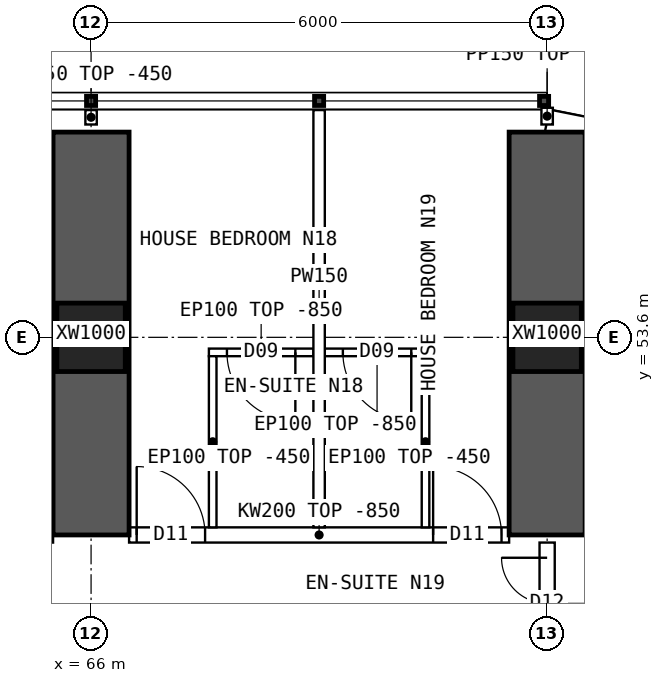
"""IFC4 building model, lengths in metres.
Left out: names, types, materials, properties, quantities, classifications, styles, units other than length and angle.
Written with IfcOpenShell. Run it as: python <this file> out.ifc"""

import sys

from ifc_helpers import new_model, si_unit, direction, frame, frame_2d, origin, origin_2d, place, context, subcontext, project, spatial, polyline, rectangle, hollow_rectangle, outline, extrude, element, fill, save


model = new_model("IFC4")
c1 = context("Model", 3, precision=1e-05, world=origin(), true_north=direction((0.0, 1.0)))
c2 = subcontext(c1, "Body", "Model", "MODEL_VIEW")
j1 = project(units=[si_unit("LENGTHUNIT", "METRE"), si_unit("PLANEANGLEUNIT", "RADIAN")], contexts=[c1])
p1 = place(None, origin())
s1 = spatial("IfcSite", under=j1, at=p1, CompositionType="ELEMENT")
p2 = place(p1, origin())
s2 = spatial("IfcBuilding", under=s1, at=p2, CompositionType="ELEMENT")
p3 = place(p2, frame((0.0, 0.0, 35.2)))
s3 = spatial("IfcBuildingStorey", under=s2, at=p3, CompositionType="ELEMENT", Elevation=35.2)
for number, where, z_axis, x_axis in (
    (1, (66.0, 53.6, 0.0), (0.0, 0.0, 1.0), (1.0, 0.0, 0.0)),
    (2, (72.0, 53.6, 0.0), (0.0, 0.0, 1.0), (1.0, 0.0, 0.0)),
):
    element("IfcColumn", number, at=place(p3, frame(where, z_axis=z_axis, x_axis=x_axis)), inside=s3, PredefinedType="COLUMN", context=c2, shape_type="SweptSolid", body=[
        extrude(hollow_rectangle(XDim=0.9, YDim=0.9, WallThickness=0.09, at=origin_2d()), origin(), (0.0, 0.0, 1.0), 3.75),
    ])
for number, where, z_axis, x_axis in (
    (3, (66.0, 51.0, 0.0), (0.0, 0.0, 1.0), (0.0, 1.0, 0.0)),
    (4, (72.0, 51.0, 0.0), (0.0, 0.0, 1.0), (0.0, 1.0, 0.0)),
):
    element("IfcWall", number, at=place(p3, frame(where, z_axis=z_axis, x_axis=x_axis)), inside=s3, PredefinedType="SHEAR", context=c2, shape_type="SweptSolid", body=[
        extrude(rectangle(XDim=5.3, YDim=1.0, at=frame_2d((2.65, 0.0))), origin(), (0.0, 0.0, 1.0), 3.75),
    ])
p4 = place(p3, frame((75.157, 55.822, 0.0), z_axis=(0.0, 0.0, 1.0), x_axis=(-0.980787251524, 0.195080412259, 0.0)))
e5 = element("IfcWall", 5, at=p4, inside=s3, PredefinedType="SOLIDWALL", context=c2, shape_type="SweptSolid", body=[
    extrude(outline(polyline([(-0.03, -0.15), (3.249, -0.15), (3.189, 0.15), (0.03, 0.15), (-0.03, -0.15)])), origin(), (0.0, 0.0, 1.0), 3.3),
])
p5 = place(p4, frame((0.909, 0.0, 0.9)))
e6 = element("IfcOpeningElement", 6, at=p5, cuts=e5, PredefinedType="OPENING", context=c2, shape_type="SweptSolid", body=[
    extrude(rectangle(XDim=1.4, YDim=1.8, at=frame_2d((0.7, 0.9))), frame((0.0, 0.16, 0.0), z_axis=(0.0, -1.0, 0.0), x_axis=(1.0, 0.0, 0.0)), (0.0, 0.0, 1.0), 0.32),
])
p6 = place(p3, frame((66.5, 51.0, 0.0), z_axis=(0.0, 0.0, 1.0), x_axis=(1.0, 0.0, 0.0)))
e7 = element("IfcWall", 7, at=p6, inside=s3, PredefinedType="SOLIDWALL", context=c2, shape_type="SweptSolid", body=[
    extrude(outline(polyline([(0.0, 0.0), (5.0, 0.0), (5.0, 2.9), (0.0, 2.9), (0.0, 0.0)])), frame((0.0, 0.1, 0.0), z_axis=(0.0, -1.0, 0.0), x_axis=(1.0, 0.0, 0.0)), (0.0, 0.0, 1.0), 0.2),
])
p7 = place(p6, frame((0.1, 0.0, 0.0)))
e8 = element("IfcOpeningElement", 8, at=p7, cuts=e7, PredefinedType="OPENING", context=c2, shape_type="SweptSolid", body=[
    extrude(rectangle(XDim=0.9, YDim=2.1, at=frame_2d((0.45, 1.05))), frame((0.0, 0.11, 0.0), z_axis=(0.0, -1.0, 0.0), x_axis=(1.0, 0.0, 0.0)), (0.0, 0.0, 1.0), 0.22),
])
p8 = place(p6, frame((4.0, 0.0, 0.0)))
e9 = element("IfcOpeningElement", 9, at=p8, cuts=e7, PredefinedType="OPENING", context=c2, shape_type="SweptSolid", body=[
    extrude(rectangle(XDim=0.9, YDim=2.1, at=frame_2d((0.45, 1.05))), frame((0.0, 0.11, 0.0), z_axis=(0.0, -1.0, 0.0), x_axis=(1.0, 0.0, 0.0)), (0.0, 0.0, 1.0), 0.22),
])
p9 = place(p3, frame((69.0, 56.59, 0.0), z_axis=(0.0, 0.0, 1.0), x_axis=(0.0, -1.0, 0.0)))
e10 = element("IfcWall", 10, at=p9, inside=s3, PredefinedType="PARTITIONING", context=c2, shape_type="SweptSolid", body=[
    extrude(outline(polyline([(0.0, 0.0), (5.49, 0.0), (5.49, 2.9), (5.442, 2.9), (5.44, 3.3), (3.192, 3.3), (3.19, 2.9), (2.792, 2.9), (2.79, 3.3), (0.0, 3.3), (0.0, 0.0)])), frame((0.0, 0.075, 0.0), z_axis=(0.0, -1.0, 0.0), x_axis=(1.0, 0.0, 0.0)), (0.0, 0.0, 1.0), 0.15),
])
p10 = place(p3, frame((67.55, 53.402, 0.0), z_axis=(0.0, 0.0, 1.0), x_axis=(1.0, 0.0, 0.0)))
e11 = element("IfcWall", 11, at=p10, inside=s3, PredefinedType="PARTITIONING", context=c2, shape_type="SweptSolid", body=[
    extrude(outline(polyline([(0.0, 0.0), (1.375, 0.0), (1.375, 2.9), (0.0, 2.9), (0.0, 0.0)])), frame((0.0, 0.05, 0.0), z_axis=(0.0, -1.0, 0.0), x_axis=(1.0, 0.0, 0.0)), (0.0, 0.0, 1.0), 0.1),
])
p11 = place(p10, frame((0.238, 0.0, 0.0)))
e12 = element("IfcOpeningElement", 12, at=p11, cuts=e11, PredefinedType="OPENING", context=c2, shape_type="SweptSolid", body=[
    extrude(rectangle(XDim=0.9, YDim=2.1, at=frame_2d((0.45, 1.05))), frame((0.0, 0.06, 0.0), z_axis=(0.0, -1.0, 0.0), x_axis=(1.0, 0.0, 0.0)), (0.0, 0.0, 1.0), 0.12),
])
p12 = place(p3, frame((67.6, 53.352, 0.0), z_axis=(0.0, 0.0, 1.0), x_axis=(0.0, -1.0, 0.0)))
e13 = element("IfcWall", 13, at=p12, inside=s3, PredefinedType="PARTITIONING", context=c2, shape_type="SweptSolid", body=[
    extrude(outline(polyline([(0.0, 0.0), (2.252, 0.0), (2.252, 2.9), (2.204, 2.9), (2.202, 3.3), (0.0, 3.3), (0.0, 0.0)])), frame((0.0, 0.05, 0.0), z_axis=(0.0, -1.0, 0.0), x_axis=(1.0, 0.0, 0.0)), (0.0, 0.0, 1.0), 0.1),
])
p13 = place(p3, frame((69.075, 53.402, 0.0), z_axis=(0.0, 0.0, 1.0), x_axis=(1.0, 0.0, 0.0)))
e14 = element("IfcWall", 14, at=p13, inside=s3, PredefinedType="PARTITIONING", context=c2, shape_type="SweptSolid", body=[
    extrude(outline(polyline([(0.0, 0.0), (1.375, 0.0), (1.375, 2.9), (0.0, 2.9), (0.0, 0.0)])), frame((0.0, 0.05, 0.0), z_axis=(0.0, -1.0, 0.0), x_axis=(1.0, 0.0, 0.0)), (0.0, 0.0, 1.0), 0.1),
])
p14 = place(p13, frame((0.238, 0.0, 0.0)))
e15 = element("IfcOpeningElement", 15, at=p14, cuts=e14, PredefinedType="OPENING", context=c2, shape_type="SweptSolid", body=[
    extrude(rectangle(XDim=0.9, YDim=2.1, at=frame_2d((0.45, 1.05))), frame((0.0, 0.06, 0.0), z_axis=(0.0, -1.0, 0.0), x_axis=(1.0, 0.0, 0.0)), (0.0, 0.0, 1.0), 0.12),
])
p15 = place(p3, frame((70.4, 53.352, 0.0), z_axis=(0.0, 0.0, 1.0), x_axis=(0.0, -1.0, 0.0)))
e16 = element("IfcWall", 16, at=p15, inside=s3, PredefinedType="PARTITIONING", context=c2, shape_type="SweptSolid", body=[
    extrude(outline(polyline([(0.0, 0.0), (2.252, 0.0), (2.252, 2.9), (2.204, 2.9), (2.202, 3.3), (0.0, 3.3), (0.0, 0.0)])), frame((0.0, 0.05, 0.0), z_axis=(0.0, -1.0, 0.0), x_axis=(1.0, 0.0, 0.0)), (0.0, 0.0, 1.0), 0.1),
])
p16 = place(p3, frame((72.0, 49.3, 0.0), z_axis=(0.0, 0.0, 1.0), x_axis=(0.0, 1.0, 0.0)))
e17 = element("IfcWall", 17, at=p16, inside=s3, PredefinedType="SOLIDWALL", context=c2, shape_type="SweptSolid", body=[
    extrude(outline(polyline([(0.0, 0.0), (1.6, 0.0), (1.6, 2.85), (0.0, 2.85), (0.0, 0.0)])), frame((0.0, 0.1, 0.0), z_axis=(0.0, -1.0, 0.0), x_axis=(1.0, 0.0, 0.0)), (0.0, 0.0, 1.0), 0.2),
])
p17 = place(p16, frame((0.2, 0.0, 0.0)))
e18 = element("IfcOpeningElement", 18, at=p17, cuts=e17, PredefinedType="OPENING", context=c2, shape_type="SweptSolid", body=[
    extrude(rectangle(XDim=1.2, YDim=2.1, at=frame_2d((0.6, 1.05))), frame((0.0, 0.11, 0.0), z_axis=(0.0, -1.0, 0.0), x_axis=(1.0, 0.0, 0.0)), (0.0, 0.0, 1.0), 0.22),
])
p18 = place(p3, frame((66.0, 56.4, 0.0), z_axis=(0.0, 0.0, 1.0), x_axis=(0.0, 1.0, 0.0)))
e19 = element("IfcWall", 19, at=p18, inside=s3, PredefinedType="PARTITIONING", context=c2, shape_type="SweptSolid", body=[
    extrude(rectangle(XDim=0.19, YDim=0.15, at=frame_2d((0.095, 0.0))), origin(), (0.0, 0.0, 1.0), 3.3),
])
p19 = place(p3, frame((72.0, 56.4, 0.0), z_axis=(0.0, 0.0, 1.0), x_axis=(0.0, 1.0, 0.0)))
e20 = element("IfcWall", 20, at=p19, inside=s3, PredefinedType="PARTITIONING", context=c2, shape_type="SweptSolid", body=[
    extrude(rectangle(XDim=0.22, YDim=0.15, at=frame_2d((0.11, 0.0))), origin(), (0.0, 0.0, 1.0), 3.3),
])
p20 = place(p11, origin())
e21 = element("IfcDoor", 21, at=p20, inside=s3, OperationType="SINGLE_SWING_RIGHT", PredefinedType="DOOR", context=c2, shape_type="SweptSolid", body=[
    extrude(rectangle(XDim=0.9, YDim=2.1, at=frame_2d((0.45, 1.05))), frame((0.0, 0.025, 0.0), z_axis=(0.0, -1.0, 0.0), x_axis=(1.0, 0.0, 0.0)), (0.0, 0.0, 1.0), 0.05),
])
fill(e12, e21)
p21 = place(p7, origin())
e22 = element("IfcDoor", 22, at=p21, inside=s3, OperationType="SINGLE_SWING_LEFT", PredefinedType="DOOR", context=c2, shape_type="SweptSolid", body=[
    extrude(rectangle(XDim=0.9, YDim=2.1, at=frame_2d((0.45, 1.05))), frame((0.0, 0.025, 0.0), z_axis=(0.0, -1.0, 0.0), x_axis=(1.0, 0.0, 0.0)), (0.0, 0.0, 1.0), 0.05),
])
fill(e8, e22)
p22 = place(p14, origin())
e23 = element("IfcDoor", 23, at=p22, inside=s3, OperationType="SINGLE_SWING_RIGHT", PredefinedType="DOOR", context=c2, shape_type="SweptSolid", body=[
    extrude(rectangle(XDim=0.9, YDim=2.1, at=frame_2d((0.45, 1.05))), frame((0.0, 0.025, 0.0), z_axis=(0.0, -1.0, 0.0), x_axis=(1.0, 0.0, 0.0)), (0.0, 0.0, 1.0), 0.05),
])
fill(e15, e23)
p23 = place(p8, origin())
e24 = element("IfcDoor", 24, at=p23, inside=s3, OperationType="SINGLE_SWING_LEFT", PredefinedType="DOOR", context=c2, shape_type="SweptSolid", body=[
    extrude(rectangle(XDim=0.9, YDim=2.1, at=frame_2d((0.45, 1.05))), frame((0.0, 0.025, 0.0), z_axis=(0.0, -1.0, 0.0), x_axis=(1.0, 0.0, 0.0)), (0.0, 0.0, 1.0), 0.05),
])
fill(e9, e24)
p24 = place(p17, origin())
e25 = element("IfcDoor", 25, at=p24, inside=s3, OperationType="DOUBLE_DOOR_SINGLE_SWING", PredefinedType="DOOR", context=c2, shape_type="SweptSolid", body=[
    extrude(rectangle(XDim=1.2, YDim=2.1, at=frame_2d((0.6, 1.05))), frame((0.0, 0.025, 0.0), z_axis=(0.0, -1.0, 0.0), x_axis=(1.0, 0.0, 0.0)), (0.0, 0.0, 1.0), 0.05),
])
fill(e18, e25)
save(model, sys.argv[1])
